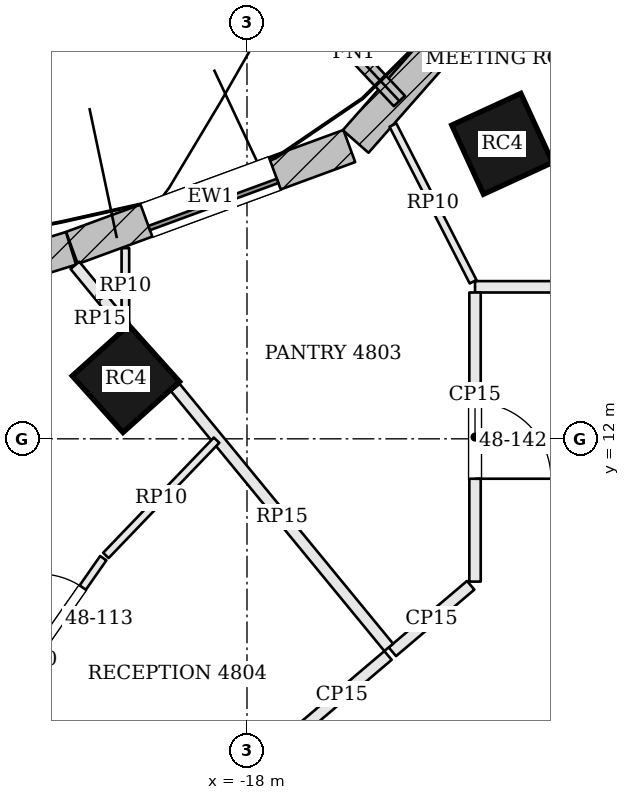
"""IFC4 building model, lengths in metres.
Left out: names, types, materials, properties, quantities, classifications, styles, units other than length and angle.
Written with IfcOpenShell. Run it as: python <this file> out.ifc"""

import sys

from ifc_helpers import new_model, si_unit, direction, frame, frame_2d, origin, origin_2d, place, context, subcontext, project, spatial, rectangle, extrude, element, fill, save


model = new_model("IFC4")
c1 = context("Model", 3, precision=1e-05, world=origin(), true_north=direction((0.0, 1.0)))
c2 = subcontext(c1, "Body", "Model", "MODEL_VIEW")
j1 = project(units=[si_unit("LENGTHUNIT", "METRE"), si_unit("PLANEANGLEUNIT", "RADIAN")], contexts=[c1])
p1 = place(None, origin())
s1 = spatial("IfcSite", under=j1, at=p1, CompositionType="ELEMENT")
p2 = place(p1, origin())
s2 = spatial("IfcBuilding", under=s1, at=p2, CompositionType="ELEMENT")
p3 = place(p2, frame((0.0, 0.0, 197.4)))
s3 = spatial("IfcBuildingStorey", under=s2, at=p3, CompositionType="ELEMENT", Elevation=197.4)
for number, where, z_axis, x_axis in (
    (1, (-14.643, 15.881, 0.0), (0.0, 0.0, 1.0), (-0.909, -0.417, 0.0)),
    (2, (-19.593, 12.79, 0.0), (0.0, 0.0, 1.0), (-0.744, -0.668, 0.0)),
):
    element("IfcColumn", number, at=place(p3, frame(where, z_axis=z_axis, x_axis=x_axis)), inside=s3, PredefinedType="COLUMN", context=c2, shape_type="SweptSolid", body=[
        extrude(rectangle(XDim=1.0, YDim=1.0, at=origin_2d()), origin(), (0.0, 0.0, 1.0), 3.9),
    ])
p4 = place(p3, frame((-13.221, 19.719, 0.0), z_axis=(0.0, 0.0, 1.0), x_axis=(-0.660424908916, -0.750892095899, 0.0)))
e3 = element("IfcWall", 3, at=p4, inside=s3, PredefinedType="SOLIDWALL", context=c2, shape_type="SweptSolid", body=[
    extrude(rectangle(XDim=5.071, YDim=0.45, at=frame_2d((2.535, 0.0))), origin(), (0.0, 0.0, 1.0), 3.7),
])
p5 = place(p4, frame((1.485, 0.0, 0.9)))
e4 = element("IfcOpeningElement", 4, at=p5, cuts=e3, PredefinedType="OPENING", context=c2, shape_type="SweptSolid", body=[
    extrude(rectangle(XDim=2.1, YDim=2.3, at=frame_2d((1.05, 1.15))), frame((0.0, 0.235, 0.0), z_axis=(0.0, -1.0, 0.0), x_axis=(1.0, 0.0, 0.0)), (0.0, 0.0, 1.0), 0.47),
])
p6 = place(p3, frame((-16.654, 15.852, 0.0), z_axis=(0.0, 0.0, 1.0), x_axis=(-0.938636568132, -0.344907803572, 0.0)))
e5 = element("IfcWall", 5, at=p6, inside=s3, PredefinedType="SOLIDWALL", context=c2, shape_type="SweptSolid", body=[
    extrude(rectangle(XDim=3.887, YDim=0.45, at=frame_2d((1.944, 0.0))), origin(), (0.0, 0.0, 1.0), 3.7),
])
p7 = place(p6, frame((1.044, 0.0, 0.9)))
e6 = element("IfcOpeningElement", 6, at=p7, cuts=e5, PredefinedType="OPENING", context=c2, shape_type="SweptSolid", body=[
    extrude(rectangle(XDim=1.8, YDim=2.3, at=frame_2d((0.9, 1.15))), frame((0.0, 0.235, 0.0), z_axis=(0.0, -1.0, 0.0), x_axis=(1.0, 0.0, 0.0)), (0.0, 0.0, 1.0), 0.47),
])
p8 = place(p3, frame((-20.316, 14.507, 0.0), z_axis=(0.0, 0.0, 1.0), x_axis=(-0.954807195185, -0.297225873743, 0.0)))
e7 = element("IfcWall", 7, at=p8, inside=s3, PredefinedType="SOLIDWALL", context=c2, shape_type="SweptSolid", body=[
    extrude(rectangle(XDim=5.526, YDim=0.45, at=frame_2d((2.763, 0.0))), origin(), (0.0, 0.0, 1.0), 3.7),
])
p9 = place(p8, frame((1.713, 0.0, 0.9)))
e8 = element("IfcOpeningElement", 8, at=p9, cuts=e7, PredefinedType="OPENING", context=c2, shape_type="SweptSolid", body=[
    extrude(rectangle(XDim=2.1, YDim=2.3, at=frame_2d((1.05, 1.15))), frame((0.0, 0.235, 0.0), z_axis=(0.0, -1.0, 0.0), x_axis=(1.0, 0.0, 0.0)), (0.0, 0.0, 1.0), 0.47),
])
p10 = place(p3, frame((-15.995, 16.444, 0.0), z_axis=(0.0, 0.0, 1.0), x_axis=(-0.683852936488, 0.729619874494, 0.0)))
e9 = element("IfcWall", 9, at=p10, inside=s3, PredefinedType="SOLIDWALL", context=c2, shape_type="SweptSolid", body=[
    extrude(rectangle(XDim=1.75, YDim=0.2, at=frame_2d((0.875, 0.0))), origin(), (0.0, 0.0, 1.0), 3.7),
])
p11 = place(p3, frame((-3.246, 14.0, 0.0), z_axis=(0.0, 0.0, 1.0), x_axis=(-1.0, 0.0, 0.0)))
e10 = element("IfcWall", 10, at=p11, inside=s3, PredefinedType="PARTITIONING", context=c2, shape_type="SweptSolid", body=[
    extrude(rectangle(XDim=11.754, YDim=0.15, at=frame_2d((5.877, 0.0))), origin(), (0.0, 0.0, 1.0), 3.084),
])
p12 = place(p11, frame((2.025, 0.0, 0.0)))
e11 = element("IfcOpeningElement", 11, at=p12, cuts=e10, PredefinedType="OPENING", context=c2, shape_type="SweptSolid", body=[
    extrude(rectangle(XDim=1.8, YDim=2.1, at=frame_2d((0.9, 1.05))), frame((0.0, 0.085, 0.0), z_axis=(0.0, -1.0, 0.0), x_axis=(1.0, 0.0, 0.0)), (0.0, 0.0, 1.0), 0.17),
])
p13 = place(p11, frame((6.792, 0.0, 0.0)))
e12 = element("IfcOpeningElement", 12, at=p13, cuts=e10, PredefinedType="OPENING", context=c2, shape_type="SweptSolid", body=[
    extrude(rectangle(XDim=1.0, YDim=2.4, at=frame_2d((0.5, 1.2))), frame((0.0, 0.085, 0.0), z_axis=(0.0, -1.0, 0.0), x_axis=(1.0, 0.0, 0.0)), (0.0, 0.0, 1.0), 0.17),
])
p14 = place(p11, frame((9.702, 0.0, 0.0)))
e13 = element("IfcOpeningElement", 13, at=p14, cuts=e10, PredefinedType="OPENING", context=c2, shape_type="SweptSolid", body=[
    extrude(rectangle(XDim=1.0, YDim=2.4, at=frame_2d((0.5, 1.2))), frame((0.0, 0.085, 0.0), z_axis=(0.0, -1.0, 0.0), x_axis=(1.0, 0.0, 0.0)), (0.0, 0.0, 1.0), 0.17),
])
p15 = place(p3, frame((-15.0, 13.925, 0.0), z_axis=(0.0, 0.0, 1.0), x_axis=(0.0, -1.0, 0.0)))
e14 = element("IfcWall", 14, at=p15, inside=s3, PredefinedType="PARTITIONING", context=c2, shape_type="SweptSolid", body=[
    extrude(rectangle(XDim=3.803, YDim=0.15, at=frame_2d((1.902, 0.0))), origin(), (0.0, 0.0, 1.0), 3.084),
])
p16 = place(p15, frame((1.45, 0.0, 0.0)))
e15 = element("IfcOpeningElement", 15, at=p16, cuts=e14, PredefinedType="OPENING", context=c2, shape_type="SweptSolid", body=[
    extrude(rectangle(XDim=1.0, YDim=2.1, at=frame_2d((0.5, 1.05))), frame((0.0, 0.085, 0.0), z_axis=(0.0, -1.0, 0.0), x_axis=(1.0, 0.0, 0.0)), (0.0, 0.0, 1.0), 0.17),
])
p17 = place(p3, frame((-15.057, 10.073, 0.0), z_axis=(0.0, 0.0, 1.0), x_axis=(-0.762460526674, -0.647034732657, 0.0)))
e16 = element("IfcWall", 16, at=p17, inside=s3, PredefinedType="PARTITIONING", context=c2, shape_type="SweptSolid", body=[
    extrude(rectangle(XDim=1.352, YDim=0.15, at=frame_2d((0.676, 0.0))), origin(), (0.0, 0.0, 1.0), 3.084),
])
p18 = place(p3, frame((-20.264, 14.283, 0.0), z_axis=(0.0, 0.0, 1.0), x_axis=(0.634834544887, -0.77264810918, 0.0)))
e17 = element("IfcWall", 17, at=p18, inside=s3, PredefinedType="PARTITIONING", context=c2, shape_type="SweptSolid", body=[
    extrude(rectangle(XDim=1.04, YDim=0.15, at=frame_2d((0.52, 0.0))), origin(), (0.0, 0.0, 1.0), 3.084),
])
p19 = place(p3, frame((-18.943, 12.675, 0.0), z_axis=(0.0, 0.0, 1.0), x_axis=(0.634718238965, -0.772743655507, 0.0)))
e18 = element("IfcWall", 18, at=p19, inside=s3, PredefinedType="PARTITIONING", context=c2, shape_type="SweptSolid", body=[
    extrude(rectangle(XDim=4.424, YDim=0.15, at=frame_2d((2.212, 0.0))), origin(), (0.0, 0.0, 1.0), 3.084),
])
p20 = place(p3, frame((-16.145, 9.15, 0.0), z_axis=(0.0, 0.0, 1.0), x_axis=(-0.762375713691, -0.647134662318, 0.0)))
e19 = element("IfcWall", 19, at=p20, inside=s3, PredefinedType="PARTITIONING", context=c2, shape_type="SweptSolid", body=[
    extrude(rectangle(XDim=1.587, YDim=0.15, at=frame_2d((0.793, 0.0))), origin(), (0.0, 0.0, 1.0), 3.084),
])
p21 = place(p3, frame((-19.6, 13.506, 0.0), z_axis=(0.0, 0.0, 1.0), x_axis=(0.0, 1.0, 0.0)))
e20 = element("IfcWall", 20, at=p21, inside=s3, PredefinedType="PARTITIONING", context=c2, shape_type="SweptSolid", body=[
    extrude(rectangle(XDim=1.003, YDim=0.1, at=frame_2d((0.501, 0.0))), origin(), (0.0, 0.0, 1.0), 3.084),
])
p22 = place(p3, frame((-15.025, 14.067, 0.0), z_axis=(0.0, 0.0, 1.0), x_axis=(-0.455543812182, 0.890213364977, 0.0)))
e21 = element("IfcWall", 21, at=p22, inside=s3, PredefinedType="PARTITIONING", context=c2, shape_type="SweptSolid", body=[
    extrude(rectangle(XDim=2.316, YDim=0.1, at=frame_2d((1.158, 0.0))), origin(), (0.0, 0.0, 1.0), 3.084),
])
p23 = place(p3, frame((-21.763, 7.746, 0.0), z_axis=(0.0, 0.0, 1.0), x_axis=(0.57207420081, 0.820201870741, 0.0)))
e22 = element("IfcWall", 22, at=p23, inside=s3, PredefinedType="PARTITIONING", context=c2, shape_type="SweptSolid", body=[
    extrude(rectangle(XDim=3.271, YDim=0.1, at=frame_2d((1.636, 0.0))), origin(), (0.0, 0.0, 1.0), 3.084),
])
p24 = place(p23, frame((1.8, 0.0, 0.0)))
e23 = element("IfcOpeningElement", 23, at=p24, cuts=e22, PredefinedType="OPENING", context=c2, shape_type="SweptSolid", body=[
    extrude(rectangle(XDim=1.0, YDim=2.1, at=frame_2d((0.5, 1.05))), frame((0.0, 0.06, 0.0), z_axis=(0.0, -1.0, 0.0), x_axis=(1.0, 0.0, 0.0)), (0.0, 0.0, 1.0), 0.12),
])
p25 = place(p3, frame((-19.856, 10.466, 0.0), z_axis=(0.0, 0.0, 1.0), x_axis=(0.692739664865, 0.721187740275, 0.0)))
e24 = element("IfcWall", 24, at=p25, inside=s3, PredefinedType="PARTITIONING", context=c2, shape_type="SweptSolid", body=[
    extrude(rectangle(XDim=2.103, YDim=0.1, at=frame_2d((1.051, 0.0))), origin(), (0.0, 0.0, 1.0), 3.084),
])
p26 = place(p5, origin())
e25 = element("IfcWindow", 25, at=p26, inside=s3, PartitioningType="SINGLE_PANEL", PredefinedType="WINDOW", context=c2, shape_type="SweptSolid", body=[
    extrude(rectangle(XDim=2.1, YDim=2.3, at=frame_2d((1.05, 1.15))), frame((0.0, 0.135, 0.0), z_axis=(0.0, -1.0, 0.0), x_axis=(1.0, 0.0, 0.0)), (0.0, 0.0, 1.0), 0.06),
])
fill(e4, e25)
p27 = place(p7, origin())
e26 = element("IfcWindow", 26, at=p27, inside=s3, PartitioningType="SINGLE_PANEL", PredefinedType="WINDOW", context=c2, shape_type="SweptSolid", body=[
    extrude(rectangle(XDim=1.8, YDim=2.3, at=frame_2d((0.9, 1.15))), frame((0.0, 0.135, 0.0), z_axis=(0.0, -1.0, 0.0), x_axis=(1.0, 0.0, 0.0)), (0.0, 0.0, 1.0), 0.06),
])
fill(e6, e26)
p28 = place(p24, origin())
e27 = element("IfcDoor", 27, at=p28, inside=s3, OperationType="SINGLE_SWING_LEFT", PredefinedType="DOOR", context=c2, shape_type="SweptSolid", body=[
    extrude(rectangle(XDim=1.0, YDim=2.1, at=frame_2d((0.5, 1.05))), frame((0.0, 0.025, 0.0), z_axis=(0.0, -1.0, 0.0), x_axis=(1.0, 0.0, 0.0)), (0.0, 0.0, 1.0), 0.05),
])
fill(e23, e27)
p29 = place(p16, origin())
e28 = element("IfcDoor", 28, at=p29, inside=s3, OperationType="SINGLE_SWING_RIGHT", PredefinedType="DOOR", context=c2, shape_type="SweptSolid", body=[
    extrude(rectangle(XDim=1.0, YDim=2.1, at=frame_2d((0.5, 1.05))), frame((0.0, 0.025, 0.0), z_axis=(0.0, -1.0, 0.0), x_axis=(1.0, 0.0, 0.0)), (0.0, 0.0, 1.0), 0.05),
])
fill(e15, e28)
save(model, sys.argv[1])
